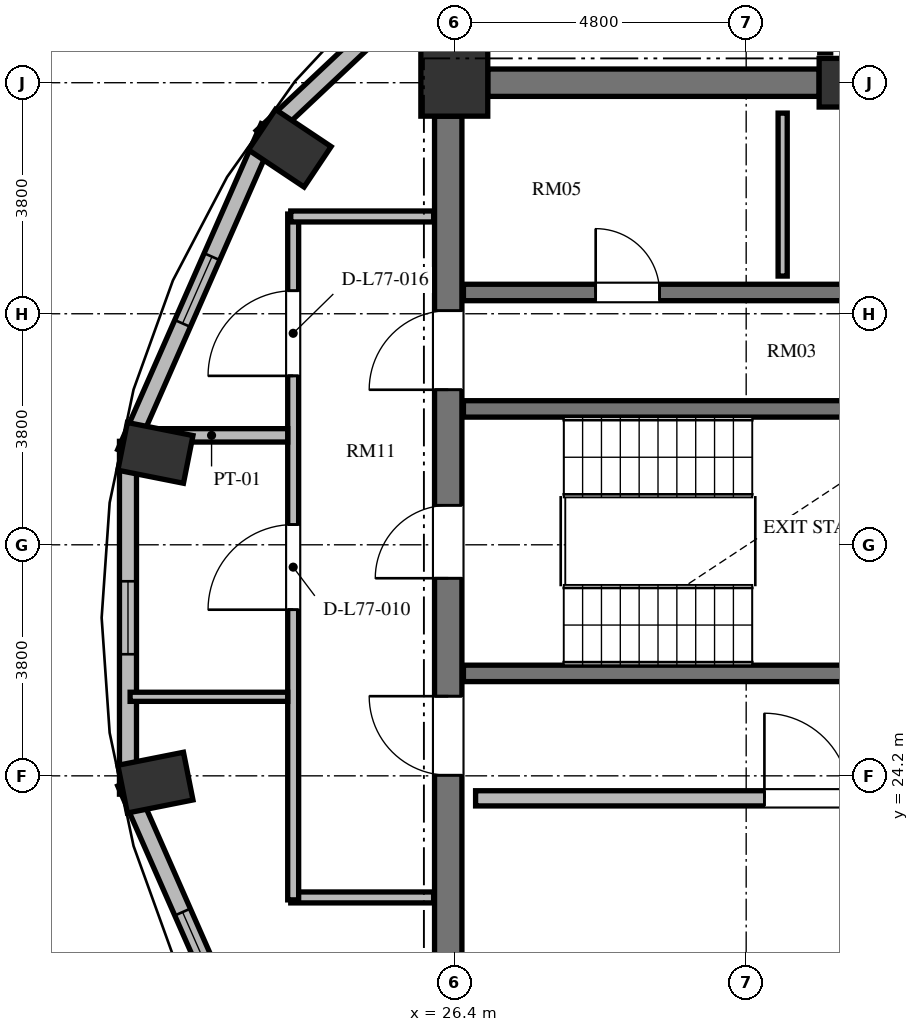
"""IFC4 building model, lengths in metres.
Left out: names, types, materials, properties, quantities, classifications, styles, units other than length and angle.
Written with IfcOpenShell. Run it as: python <this file> out.ifc"""

import sys

from ifc_helpers import new_model, si_unit, direction, frame, frame_2d, origin, origin_2d, place, context, subcontext, project, spatial, rectangle, extrude, element, fill, save


model = new_model("IFC4")
c1 = context("Model", 3, precision=1e-05, world=origin(), true_north=direction((0.0, 1.0)))
c2 = subcontext(c1, "Body", "Model", "MODEL_VIEW")
j1 = project(units=[si_unit("LENGTHUNIT", "METRE"), si_unit("PLANEANGLEUNIT", "RADIAN")], contexts=[c1])
p1 = place(None, origin())
s1 = spatial("IfcSite", under=j1, at=p1, CompositionType="ELEMENT")
p2 = place(p1, origin())
s2 = spatial("IfcBuilding", under=s1, at=p2, CompositionType="ELEMENT")
p3 = place(p2, frame((0.0, 0.0, 295.152)))
s3 = spatial("IfcBuildingStorey", under=s2, at=p3, CompositionType="ELEMENT", Elevation=295.152)
for number, where, z_axis, x_axis in (
    (1, (23.694, 34.522, 0.0), (0.0, 0.0, 1.0), (-0.831, 0.556, 0.0)),
    (2, (21.484, 29.512, 0.0), (0.0, 0.0, 1.0), (-0.981, 0.195, 0.0)),
    (3, (21.484, 24.088, 0.0), (0.0, 0.0, 1.0), (-0.981, -0.195, 0.0)),
):
    element("IfcColumn", number, at=place(p3, frame(where, z_axis=z_axis, x_axis=x_axis)), inside=s3, PredefinedType="COLUMN", context=c2, shape_type="SweptSolid", body=[
        extrude(rectangle(XDim=1.1, YDim=0.8, at=origin_2d()), origin(), (0.0, 0.0, 1.0), 3.648),
    ])
p4 = place(p3, frame((32.8, 35.6, 0.0), z_axis=(0.0, 0.0, 1.0), x_axis=(1.0, 0.0, 0.0)))
e4 = element("IfcColumn", 4, at=p4, inside=s3, PredefinedType="COLUMN", context=c2, shape_type="SweptSolid", body=[
    extrude(rectangle(XDim=0.8, YDim=0.8, at=origin_2d()), origin(), (0.0, 0.0, 1.0), 3.648),
])
p5 = place(p3, frame((26.4, 35.6, 0.0), z_axis=(0.0, 0.0, 1.0), x_axis=(1.0, 0.0, 0.0)))
e5 = element("IfcColumn", 5, at=p5, inside=s3, PredefinedType="COLUMN", context=c2, shape_type="SweptSolid", body=[
    extrude(rectangle(XDim=1.1, YDim=1.1, at=origin_2d()), origin(), (0.0, 0.0, 1.0), 3.648),
])
p6 = place(p3, frame((26.3, 20.95, 0.0), z_axis=(0.0, 0.0, 1.0), x_axis=(0.0, 1.0, 0.0)))
e6 = element("IfcWall", 6, at=p6, inside=s3, PredefinedType="SHEAR", context=c2, shape_type="SweptSolid", body=[
    extrude(rectangle(XDim=14.1, YDim=0.45, at=frame_2d((7.05, 0.0))), origin(), (0.0, 0.0, 1.0), 3.648),
])
p7 = place(p6, frame((6.5, 0.0, 0.0)))
e7 = element("IfcOpeningElement", 7, at=p7, cuts=e6, PredefinedType="OPENING", context=c2, shape_type="SweptSolid", body=[
    extrude(rectangle(XDim=1.2, YDim=2.15, at=frame_2d((0.6, 1.075))), frame((0.0, 0.235, 0.0), z_axis=(0.0, -1.0, 0.0), x_axis=(1.0, 0.0, 0.0)), (0.0, 0.0, 1.0), 0.47),
])
p8 = place(p6, frame((9.6, 0.0, 0.0)))
e8 = element("IfcOpeningElement", 8, at=p8, cuts=e6, PredefinedType="OPENING", context=c2, shape_type="SweptSolid", body=[
    extrude(rectangle(XDim=1.3, YDim=2.2, at=frame_2d((0.65, 1.1))), frame((0.0, 0.235, 0.0), z_axis=(0.0, -1.0, 0.0), x_axis=(1.0, 0.0, 0.0)), (0.0, 0.0, 1.0), 0.47),
])
p9 = place(p6, frame((3.26, 0.0, 0.0)))
e9 = element("IfcOpeningElement", 9, at=p9, cuts=e6, PredefinedType="OPENING", context=c2, shape_type="SweptSolid", body=[
    extrude(rectangle(XDim=1.3, YDim=2.2, at=frame_2d((0.65, 1.1))), frame((0.0, 0.235, 0.0), z_axis=(0.0, -1.0, 0.0), x_axis=(1.0, 0.0, 0.0)), (0.0, 0.0, 1.0), 0.47),
])
p10 = place(p3, frame((26.95, 35.6, 0.0), z_axis=(0.0, 0.0, 1.0), x_axis=(1.0, 0.0, 0.0)))
e10 = element("IfcWall", 10, at=p10, inside=s3, PredefinedType="SHEAR", context=c2, shape_type="SweptSolid", body=[
    extrude(rectangle(XDim=5.45, YDim=0.45, at=frame_2d((2.725, 0.0))), origin(), (0.0, 0.0, 1.0), 3.648),
])
p11 = place(p3, frame((27.595, 38.808, 0.0), z_axis=(0.0, 0.0, 1.0), x_axis=(-0.728251519923, -0.685309947199, 0.0)))
e11 = element("IfcWall", 11, at=p11, inside=s3, PredefinedType="SOLIDWALL", context=c2, shape_type="SweptSolid", body=[
    extrude(rectangle(XDim=5.981, YDim=0.28, at=frame_2d((2.99, 0.0))), origin(), (0.0, 0.0, 1.0), 3.448),
])
p12 = place(p11, frame((2.391, 0.0, 0.85)))
e12 = element("IfcOpeningElement", 12, at=p12, cuts=e11, PredefinedType="OPENING", context=c2, shape_type="SweptSolid", body=[
    extrude(rectangle(XDim=1.2, YDim=1.8, at=frame_2d((0.6, 0.9))), frame((0.0, 0.15, 0.0), z_axis=(0.0, -1.0, 0.0), x_axis=(1.0, 0.0, 0.0)), (0.0, 0.0, 1.0), 0.3),
])
p13 = place(p3, frame((23.352, 34.869, 0.0), z_axis=(0.0, 0.0, 1.0), x_axis=(-0.402882523888, -0.915251698685, 0.0)))
e13 = element("IfcWall", 13, at=p13, inside=s3, PredefinedType="SOLIDWALL", context=c2, shape_type="SweptSolid", body=[
    extrude(rectangle(XDim=5.856, YDim=0.28, at=frame_2d((2.928, 0.0))), origin(), (0.0, 0.0, 1.0), 3.448),
])
p14 = place(p13, frame((2.328, 0.0, 0.85)))
e14 = element("IfcOpeningElement", 14, at=p14, cuts=e13, PredefinedType="OPENING", context=c2, shape_type="SweptSolid", body=[
    extrude(rectangle(XDim=1.2, YDim=1.8, at=frame_2d((0.6, 0.9))), frame((0.0, 0.15, 0.0), z_axis=(0.0, -1.0, 0.0), x_axis=(1.0, 0.0, 0.0)), (0.0, 0.0, 1.0), 0.3),
])
p15 = place(p3, frame((21.033, 29.701, 0.0), z_axis=(0.0, 0.0, 1.0), x_axis=(0.0, -1.0, 0.0)))
e15 = element("IfcWall", 15, at=p15, inside=s3, PredefinedType="SOLIDWALL", context=c2, shape_type="SweptSolid", body=[
    extrude(rectangle(XDim=5.803, YDim=0.28, at=frame_2d((2.901, 0.0))), origin(), (0.0, 0.0, 1.0), 3.448),
])
p16 = place(p15, frame((2.302, 0.0, 0.85)))
e16 = element("IfcOpeningElement", 16, at=p16, cuts=e15, PredefinedType="OPENING", context=c2, shape_type="SweptSolid", body=[
    extrude(rectangle(XDim=1.2, YDim=1.8, at=frame_2d((0.6, 0.9))), frame((0.0, 0.15, 0.0), z_axis=(0.0, -1.0, 0.0), x_axis=(1.0, 0.0, 0.0)), (0.0, 0.0, 1.0), 0.3),
])
p17 = place(p3, frame((20.993, 24.09, 0.0), z_axis=(0.0, 0.0, 1.0), x_axis=(0.402867150469, -0.91525846572, 0.0)))
e17 = element("IfcWall", 17, at=p17, inside=s3, PredefinedType="SOLIDWALL", context=c2, shape_type="SweptSolid", body=[
    extrude(rectangle(XDim=5.856, YDim=0.28, at=frame_2d((2.928, 0.0))), origin(), (0.0, 0.0, 1.0), 3.448),
])
p18 = place(p17, frame((2.328, 0.0, 0.85)))
e18 = element("IfcOpeningElement", 18, at=p18, cuts=e17, PredefinedType="OPENING", context=c2, shape_type="SweptSolid", body=[
    extrude(rectangle(XDim=1.2, YDim=1.8, at=frame_2d((0.6, 0.9))), frame((0.0, 0.15, 0.0), z_axis=(0.0, -1.0, 0.0), x_axis=(1.0, 0.0, 0.0)), (0.0, 0.0, 1.0), 0.3),
])
for number, where, z_axis, x_axis in (
    (19, (26.55, 30.235, 0.0), (0.0, 0.0, 1.0), (1.0, 0.0, 0.0)),
    (20, (26.55, 25.885, 0.0), (0.0, 0.0, 1.0), (1.0, 0.0, 0.0)),
):
    element("IfcWall", number, at=place(p3, frame(where, z_axis=z_axis, x_axis=x_axis)), inside=s3, PredefinedType="SHEAR", context=c2, shape_type="SweptSolid", body=[
        extrude(rectangle(XDim=7.985, YDim=0.27, at=frame_2d((3.992, 0.0))), origin(), (0.0, 0.0, 1.0), 3.648),
    ])
p19 = place(p3, frame((26.55, 32.15, 0.0), z_axis=(0.0, 0.0, 1.0), x_axis=(1.0, 0.0, 0.0)))
e21 = element("IfcWall", 21, at=p19, inside=s3, PredefinedType="SHEAR", context=c2, shape_type="SweptSolid", body=[
    extrude(rectangle(XDim=16.4, YDim=0.27, at=frame_2d((8.2, 0.0))), origin(), (0.0, 0.0, 1.0), 3.648),
])
p20 = place(p19, frame((2.175, 0.0, 0.0)))
e22 = element("IfcOpeningElement", 22, at=p20, cuts=e21, PredefinedType="OPENING", context=c2, shape_type="SweptSolid", body=[
    extrude(rectangle(XDim=1.05, YDim=2.15, at=frame_2d((0.525, 1.075))), frame((0.0, 0.145, 0.0), z_axis=(0.0, -1.0, 0.0), x_axis=(1.0, 0.0, 0.0)), (0.0, 0.0, 1.0), 0.29),
])
p21 = place(p19, frame((7.575, 0.0, 0.0)))
e23 = element("IfcOpeningElement", 23, at=p21, cuts=e21, PredefinedType="OPENING", context=c2, shape_type="SweptSolid", body=[
    extrude(rectangle(XDim=1.05, YDim=2.15, at=frame_2d((0.525, 1.075))), frame((0.0, 0.145, 0.0), z_axis=(0.0, -1.0, 0.0), x_axis=(1.0, 0.0, 0.0)), (0.0, 0.0, 1.0), 0.29),
])
p22 = place(p19, frame((11.9, 0.0, 0.0)))
e24 = element("IfcOpeningElement", 24, at=p22, cuts=e21, PredefinedType="OPENING", context=c2, shape_type="SweptSolid", body=[
    extrude(rectangle(XDim=1.1, YDim=2.2, at=frame_2d((0.55, 1.1))), frame((0.0, 0.145, 0.0), z_axis=(0.0, -1.0, 0.0), x_axis=(1.0, 0.0, 0.0)), (0.0, 0.0, 1.0), 0.29),
])
p23 = place(p19, frame((14.5, 0.0, 0.0)))
e25 = element("IfcOpeningElement", 25, at=p23, cuts=e21, PredefinedType="OPENING", context=c2, shape_type="SweptSolid", body=[
    extrude(rectangle(XDim=1.1, YDim=2.2, at=frame_2d((0.55, 1.1))), frame((0.0, 0.145, 0.0), z_axis=(0.0, -1.0, 0.0), x_axis=(1.0, 0.0, 0.0)), (0.0, 0.0, 1.0), 0.29),
])
p24 = place(p3, frame((26.75, 23.83, 0.0), z_axis=(0.0, 0.0, 1.0), x_axis=(1.0, 0.0, 0.0)))
e26 = element("IfcWall", 26, at=p24, inside=s3, PredefinedType="SOLIDWALL", context=c2, shape_type="SweptSolid", body=[
    extrude(rectangle(XDim=16.2, YDim=0.25, at=frame_2d((8.1, 0.0))), origin(), (0.0, 0.0, 1.0), 3.448),
])
p25 = place(p24, frame((4.75, 0.0, 0.0)))
e27 = element("IfcOpeningElement", 27, at=p25, cuts=e26, PredefinedType="OPENING", context=c2, shape_type="SweptSolid", body=[
    extrude(rectangle(XDim=1.4, YDim=2.2, at=frame_2d((0.7, 1.1))), frame((0.0, 0.135, 0.0), z_axis=(0.0, -1.0, 0.0), x_axis=(1.0, 0.0, 0.0)), (0.0, 0.0, 1.0), 0.27),
])
p26 = place(p24, frame((11.7, 0.0, 0.0)))
e28 = element("IfcOpeningElement", 28, at=p26, cuts=e26, PredefinedType="OPENING", context=c2, shape_type="SweptSolid", body=[
    extrude(rectangle(XDim=1.1, YDim=2.2, at=frame_2d((0.55, 1.1))), frame((0.0, 0.135, 0.0), z_axis=(0.0, -1.0, 0.0), x_axis=(1.0, 0.0, 0.0)), (0.0, 0.0, 1.0), 0.27),
])
p27 = place(p24, frame((14.15, 0.0, 0.0)))
e29 = element("IfcOpeningElement", 29, at=p27, cuts=e26, PredefinedType="OPENING", context=c2, shape_type="SweptSolid", body=[
    extrude(rectangle(XDim=1.4, YDim=2.3, at=frame_2d((0.7, 1.15))), frame((0.0, 0.135, 0.0), z_axis=(0.0, -1.0, 0.0), x_axis=(1.0, 0.0, 0.0)), (0.0, 0.0, 1.0), 0.27),
])
p28 = place(p3, frame((31.8, 32.42, 0.0), z_axis=(0.0, 0.0, 1.0), x_axis=(0.0, 1.0, 0.0)))
e30 = element("IfcWall", 30, at=p28, inside=s3, PredefinedType="PARTITIONING", context=c2, shape_type="SweptSolid", body=[
    extrude(rectangle(XDim=2.68, YDim=0.15, at=frame_2d((1.34, 0.0))), origin(), (0.0, 0.0, 1.0), 3.448),
])
p29 = place(p3, frame((32.5, 36.09, 0.0), z_axis=(0.0, 0.0, 1.0), x_axis=(0.0, 1.0, 0.0)))
e31 = element("IfcWall", 31, at=p29, inside=s3, PredefinedType="PARTITIONING", context=c2, shape_type="SweptSolid", body=[
    extrude(rectangle(XDim=2.35, YDim=0.18, at=frame_2d((1.175, 0.0))), origin(), (0.0, 0.0, 1.0), 3.448),
])
p30 = place(p3, frame((26.06, 22.2, 0.0), z_axis=(0.0, 0.0, 1.0), x_axis=(-1.0, 0.0, 0.0)))
e32 = element("IfcWall", 32, at=p30, inside=s3, PredefinedType="PARTITIONING", context=c2, shape_type="SweptSolid", body=[
    extrude(rectangle(XDim=2.35, YDim=0.18, at=frame_2d((1.175, 0.0))), origin(), (0.0, 0.0, 1.0), 3.448),
])
p31 = place(p3, frame((23.75, 22.16, 0.0), z_axis=(0.0, 0.0, 1.0), x_axis=(0.0, 1.0, 0.0)))
e33 = element("IfcWall", 33, at=p31, inside=s3, PredefinedType="PARTITIONING", context=c2, shape_type="SweptSolid", body=[
    extrude(rectangle(XDim=11.28, YDim=0.18, at=frame_2d((5.64, 0.0))), origin(), (0.0, 0.0, 1.0), 3.448),
])
p32 = place(p31, frame((4.772, 0.0, 0.0)))
e34 = element("IfcOpeningElement", 34, at=p32, cuts=e33, PredefinedType="OPENING", context=c2, shape_type="SweptSolid", body=[
    extrude(rectangle(XDim=1.4, YDim=2.2, at=frame_2d((0.7, 1.1))), frame((0.0, 0.1, 0.0), z_axis=(0.0, -1.0, 0.0), x_axis=(1.0, 0.0, 0.0)), (0.0, 0.0, 1.0), 0.2),
])
p33 = place(p31, frame((8.618, 0.0, 0.0)))
e35 = element("IfcOpeningElement", 35, at=p33, cuts=e33, PredefinedType="OPENING", context=c2, shape_type="SweptSolid", body=[
    extrude(rectangle(XDim=1.4, YDim=2.2, at=frame_2d((0.7, 1.1))), frame((0.0, 0.1, 0.0), z_axis=(0.0, -1.0, 0.0), x_axis=(1.0, 0.0, 0.0)), (0.0, 0.0, 1.0), 0.2),
])
p34 = place(p3, frame((23.71, 33.4, 0.0), z_axis=(0.0, 0.0, 1.0), x_axis=(1.0, 0.0, 0.0)))
e36 = element("IfcWall", 36, at=p34, inside=s3, PredefinedType="PARTITIONING", context=c2, shape_type="SweptSolid", body=[
    extrude(rectangle(XDim=2.35, YDim=0.18, at=frame_2d((1.175, 0.0))), origin(), (0.0, 0.0, 1.0), 3.448),
])
p35 = place(p3, frame((21.068, 25.5, 0.0), z_axis=(0.0, 0.0, 1.0), x_axis=(1.0, 0.0, 0.0)))
e37 = element("IfcWall", 37, at=p35, inside=s3, PredefinedType="PARTITIONING", context=c2, shape_type="SweptSolid", body=[
    extrude(rectangle(XDim=2.592, YDim=0.15, at=frame_2d((1.296, 0.0))), origin(), (0.0, 0.0, 1.0), 3.448),
])
p36 = place(p3, frame((21.156, 29.8, 0.0), z_axis=(0.0, 0.0, 1.0), x_axis=(1.0, 0.0, 0.0)))
e38 = element("IfcWall", 38, at=p36, inside=s3, PredefinedType="PARTITIONING", context=c2, shape_type="SweptSolid", body=[
    extrude(rectangle(XDim=2.504, YDim=0.22, at=frame_2d((1.252, 0.0))), origin(), (0.0, 0.0, 1.0), 3.448),
])
p37 = place(p14, origin())
e39 = element("IfcWindow", 39, at=p37, inside=s3, PartitioningType="SINGLE_PANEL", PredefinedType="WINDOW", context=c2, shape_type="SweptSolid", body=[
    extrude(rectangle(XDim=1.2, YDim=1.8, at=frame_2d((0.6, 0.9))), frame((0.0, 0.03, 0.0), z_axis=(0.0, -1.0, 0.0), x_axis=(1.0, 0.0, 0.0)), (0.0, 0.0, 1.0), 0.06),
])
fill(e14, e39)
p38 = place(p16, origin())
e40 = element("IfcWindow", 40, at=p38, inside=s3, PartitioningType="SINGLE_PANEL", PredefinedType="WINDOW", context=c2, shape_type="SweptSolid", body=[
    extrude(rectangle(XDim=1.2, YDim=1.8, at=frame_2d((0.6, 0.9))), frame((0.0, 0.03, 0.0), z_axis=(0.0, -1.0, 0.0), x_axis=(1.0, 0.0, 0.0)), (0.0, 0.0, 1.0), 0.06),
])
fill(e16, e40)
p39 = place(p18, origin())
e41 = element("IfcWindow", 41, at=p39, inside=s3, PartitioningType="SINGLE_PANEL", PredefinedType="WINDOW", context=c2, shape_type="SweptSolid", body=[
    extrude(rectangle(XDim=1.2, YDim=1.8, at=frame_2d((0.6, 0.9))), frame((0.0, 0.03, 0.0), z_axis=(0.0, -1.0, 0.0), x_axis=(1.0, 0.0, 0.0)), (0.0, 0.0, 1.0), 0.06),
])
fill(e18, e41)
p40 = place(p7, origin())
e42 = element("IfcDoor", 42, at=p40, inside=s3, OperationType="SINGLE_SWING_LEFT", PredefinedType="DOOR", context=c2, shape_type="SweptSolid", body=[
    extrude(rectangle(XDim=1.2, YDim=2.15, at=frame_2d((0.6, 1.075))), frame((0.0, 0.025, 0.0), z_axis=(0.0, -1.0, 0.0), x_axis=(1.0, 0.0, 0.0)), (0.0, 0.0, 1.0), 0.05),
])
fill(e7, e42)
p41 = place(p8, origin())
e43 = element("IfcDoor", 43, at=p41, inside=s3, OperationType="SINGLE_SWING_LEFT", PredefinedType="DOOR", context=c2, shape_type="SweptSolid", body=[
    extrude(rectangle(XDim=1.3, YDim=2.2, at=frame_2d((0.65, 1.1))), frame((0.0, 0.025, 0.0), z_axis=(0.0, -1.0, 0.0), x_axis=(1.0, 0.0, 0.0)), (0.0, 0.0, 1.0), 0.05),
])
fill(e8, e43)
p42 = place(p9, origin())
e44 = element("IfcDoor", 44, at=p42, inside=s3, OperationType="SINGLE_SWING_RIGHT", PredefinedType="DOOR", context=c2, shape_type="SweptSolid", body=[
    extrude(rectangle(XDim=1.3, YDim=2.2, at=frame_2d((0.65, 1.1))), frame((0.0, 0.025, 0.0), z_axis=(0.0, -1.0, 0.0), x_axis=(1.0, 0.0, 0.0)), (0.0, 0.0, 1.0), 0.05),
])
fill(e9, e44)
p43 = place(p20, origin())
e45 = element("IfcDoor", 45, at=p43, inside=s3, OperationType="SINGLE_SWING_LEFT", PredefinedType="DOOR", context=c2, shape_type="SweptSolid", body=[
    extrude(rectangle(XDim=1.05, YDim=2.15, at=frame_2d((0.525, 1.075))), frame((0.0, 0.025, 0.0), z_axis=(0.0, -1.0, 0.0), x_axis=(1.0, 0.0, 0.0)), (0.0, 0.0, 1.0), 0.05),
])
fill(e22, e45)
p44 = place(p25, origin())
e46 = element("IfcDoor", 46, at=p44, inside=s3, OperationType="SINGLE_SWING_LEFT", PredefinedType="DOOR", context=c2, shape_type="SweptSolid", body=[
    extrude(rectangle(XDim=1.4, YDim=2.2, at=frame_2d((0.7, 1.1))), frame((0.0, 0.025, 0.0), z_axis=(0.0, -1.0, 0.0), x_axis=(1.0, 0.0, 0.0)), (0.0, 0.0, 1.0), 0.05),
])
fill(e27, e46)
p45 = place(p32, origin())
e47 = element("IfcDoor", 47, at=p45, inside=s3, OperationType="SINGLE_SWING_LEFT", PredefinedType="DOOR", context=c2, shape_type="SweptSolid", body=[
    extrude(rectangle(XDim=1.4, YDim=2.2, at=frame_2d((0.7, 1.1))), frame((0.0, 0.025, 0.0), z_axis=(0.0, -1.0, 0.0), x_axis=(1.0, 0.0, 0.0)), (0.0, 0.0, 1.0), 0.05),
])
fill(e34, e47)
p46 = place(p33, origin())
e48 = element("IfcDoor", 48, at=p46, inside=s3, OperationType="SINGLE_SWING_LEFT", PredefinedType="DOOR", context=c2, shape_type="SweptSolid", body=[
    extrude(rectangle(XDim=1.4, YDim=2.2, at=frame_2d((0.7, 1.1))), frame((0.0, 0.025, 0.0), z_axis=(0.0, -1.0, 0.0), x_axis=(1.0, 0.0, 0.0)), (0.0, 0.0, 1.0), 0.05),
])
fill(e35, e48)
save(model, sys.argv[1])
